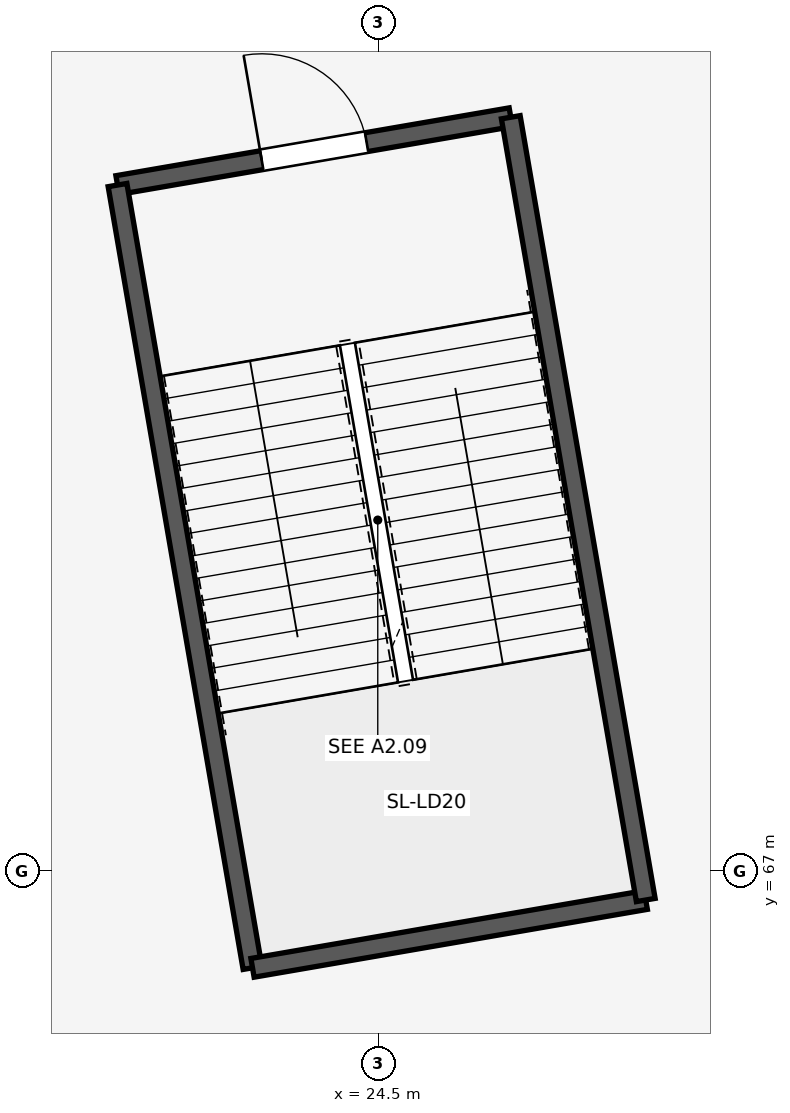
"""IFC4 building model, lengths in metres.
Left out: names, types, materials, properties, quantities, classifications, styles, units other than length and angle.
Written with IfcOpenShell. Run it as: python <this file> out.ifc"""

import sys

from ifc_helpers import new_model, si_unit, direction, frame, frame_2d, origin, place, context, subcontext, project, spatial, rectangle, extrude, element, fill, save


model = new_model("IFC4")
c1 = context("Model", 3, precision=1e-05, world=origin(), true_north=direction((0.0, 1.0)))
c2 = subcontext(c1, "Body", "Model", "MODEL_VIEW")
j1 = project(units=[si_unit("LENGTHUNIT", "METRE"), si_unit("PLANEANGLEUNIT", "RADIAN")], contexts=[c1])
p1 = place(None, origin())
s1 = spatial("IfcSite", under=j1, at=p1, CompositionType="ELEMENT")
p2 = place(p1, origin())
s2 = spatial("IfcBuilding", under=s1, at=p2, CompositionType="ELEMENT")
p3 = place(p2, frame((0.0, 0.0, 5.4)))
s3 = spatial("IfcBuildingStorey", under=s2, at=p3, CompositionType="ELEMENT", Elevation=5.4)
p4 = place(p3, frame((26.238, 76.923, 0.0), z_axis=(0.0, 0.0, 1.0), x_axis=(-0.985457162135, -0.16992404655, 0.0)))
e1 = element("IfcWall", 1, at=p4, inside=s3, PredefinedType="SHEAR", context=c2, shape_type="SweptSolid", body=[
    extrude(rectangle(XDim=5.25, YDim=0.25, at=frame_2d((2.625, 0.0))), origin(), (0.0, 0.0, 1.0), 4.92),
])
p5 = place(p4, frame((1.925, 0.0, 0.0)))
e2 = element("IfcOpeningElement", 2, at=p5, cuts=e1, PredefinedType="OPENING", context=c2, shape_type="SweptSolid", body=[
    extrude(rectangle(XDim=1.4, YDim=2.2, at=frame_2d((0.7, 1.1))), frame((0.0, 0.135, 0.0), z_axis=(0.0, -1.0, 0.0), x_axis=(1.0, 0.0, 0.0)), (0.0, 0.0, 1.0), 0.27),
])
p6 = place(p3, frame((21.064, 76.031, 0.0), z_axis=(0.0, 0.0, 1.0), x_axis=(0.169938992676, -0.985454584833, 0.0)))
e3 = element("IfcWall", 3, at=p6, inside=s3, PredefinedType="SHEAR", context=c2, shape_type="SweptSolid", body=[
    extrude(rectangle(XDim=10.45, YDim=0.25, at=frame_2d((5.225, 0.0))), origin(), (0.0, 0.0, 1.0), 4.92),
])
p7 = place(p3, frame((22.84, 65.733, 0.0), z_axis=(0.0, 0.0, 1.0), x_axis=(0.985457162135, 0.16992404655, 0.0)))
e4 = element("IfcWall", 4, at=p7, inside=s3, PredefinedType="SHEAR", context=c2, shape_type="SweptSolid", body=[
    extrude(rectangle(XDim=5.25, YDim=0.25, at=frame_2d((2.625, 0.0))), origin(), (0.0, 0.0, 1.0), 4.92),
])
p8 = place(p3, frame((28.013, 66.625, 0.0), z_axis=(0.0, 0.0, 1.0), x_axis=(-0.169938992676, 0.985454584833, 0.0)))
e5 = element("IfcWall", 5, at=p8, inside=s3, PredefinedType="SHEAR", context=c2, shape_type="SweptSolid", body=[
    extrude(rectangle(XDim=10.45, YDim=0.25, at=frame_2d((5.225, 0.0))), origin(), (0.0, 0.0, 1.0), 4.92),
])
p9 = place(p5, frame((1.4, 0.0, 0.0), z_axis=(0.0, 0.0, 1.0), x_axis=(-1.0, 0.0, 0.0)))
e6 = element("IfcDoor", 6, at=p9, inside=s3, OperationType="SINGLE_SWING_LEFT", PredefinedType="DOOR", context=c2, shape_type="SweptSolid", body=[
    extrude(rectangle(XDim=1.4, YDim=2.2, at=frame_2d((0.7, 1.1))), frame((0.0, 0.025, 0.0), z_axis=(0.0, -1.0, 0.0), x_axis=(1.0, 0.0, 0.0)), (0.0, 0.0, 1.0), 0.05),
])
fill(e2, e6)
save(model, sys.argv[1])
